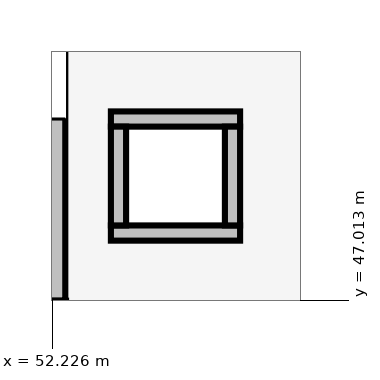
"""IFC4 building model, lengths in metres.
Left out: names, types, materials, properties, quantities, classifications, styles, units other than length and angle.
Written with IfcOpenShell. Run it as: python <this file> out.ifc"""

import sys

from ifc_helpers import new_model, si_unit, direction, frame, frame_2d, origin, place, context, subcontext, project, spatial, rectangle, extrude, element, save


model = new_model("IFC4")
c1 = context("Model", 3, precision=1e-05, world=origin(), true_north=direction((0.0, 1.0)))
c2 = subcontext(c1, "Body", "Model", "MODEL_VIEW")
j1 = project(units=[si_unit("LENGTHUNIT", "METRE"), si_unit("PLANEANGLEUNIT", "RADIAN")], contexts=[c1])
p1 = place(None, origin())
s1 = spatial("IfcSite", under=j1, at=p1, CompositionType="ELEMENT")
p2 = place(p1, origin())
s2 = spatial("IfcBuilding", under=s1, at=p2, CompositionType="ELEMENT")
p3 = place(p2, origin())
s3 = spatial("IfcBuildingStorey", under=s2, at=p3, CompositionType="ELEMENT", Elevation=0.0)
p4 = place(p3, frame((52.18, 47.01, 0.0), z_axis=(0.0, 0.0, 1.0), x_axis=(0.0, 1.0, 0.0)))
e1 = element("IfcWall", 1, at=p4, inside=s3, PredefinedType="SOLIDWALL", context=c2, shape_type="SweptSolid", body=[
    extrude(rectangle(XDim=7.18, YDim=0.44, at=frame_2d((3.59, 0.0))), origin(), (0.0, 0.0, 1.0), 4.342),
])
p5 = place(p4, frame((2.39, 0.0, 0.0)))
e2 = element("IfcOpeningElement", 2, at=p5, cuts=e1, PredefinedType="OPENING", context=c2, shape_type="SweptSolid", body=[
    extrude(rectangle(XDim=2.4, YDim=2.4, at=frame_2d((1.2, 1.2))), frame((0.0, 0.23, 0.0), z_axis=(0.0, -1.0, 0.0), x_axis=(1.0, 0.0, 0.0)), (0.0, 0.0, 1.0), 0.46),
])
for number, where, z_axis, x_axis in (
    (3, (53.0, 47.9, 0.0), (0.0, 0.0, 1.0), (1.0, 0.0, 0.0)),
    (4, (54.7, 49.4, 0.0), (0.0, 0.0, 1.0), (-1.0, 0.0, 0.0)),
):
    element("IfcWall", number, at=place(p3, frame(where, z_axis=z_axis, x_axis=x_axis)), inside=s3, PredefinedType="PARTITIONING", context=c2, shape_type="SweptSolid", body=[
        extrude(rectangle(XDim=1.7, YDim=0.2, at=frame_2d((0.85, 0.0))), origin(), (0.0, 0.0, 1.0), 5.1),
    ])
for number, where, z_axis, x_axis in (
    (5, (53.1, 48.0, 0.0), (0.0, 0.0, 1.0), (0.0, 1.0, 0.0)),
    (6, (54.6, 49.3, 0.0), (0.0, 0.0, 1.0), (0.0, -1.0, 0.0)),
):
    element("IfcWall", number, at=place(p3, frame(where, z_axis=z_axis, x_axis=x_axis)), inside=s3, PredefinedType="PARTITIONING", context=c2, shape_type="SweptSolid", body=[
        extrude(rectangle(XDim=1.3, YDim=0.2, at=frame_2d((0.65, 0.0))), origin(), (0.0, 0.0, 1.0), 5.1),
    ])
save(model, sys.argv[1])
